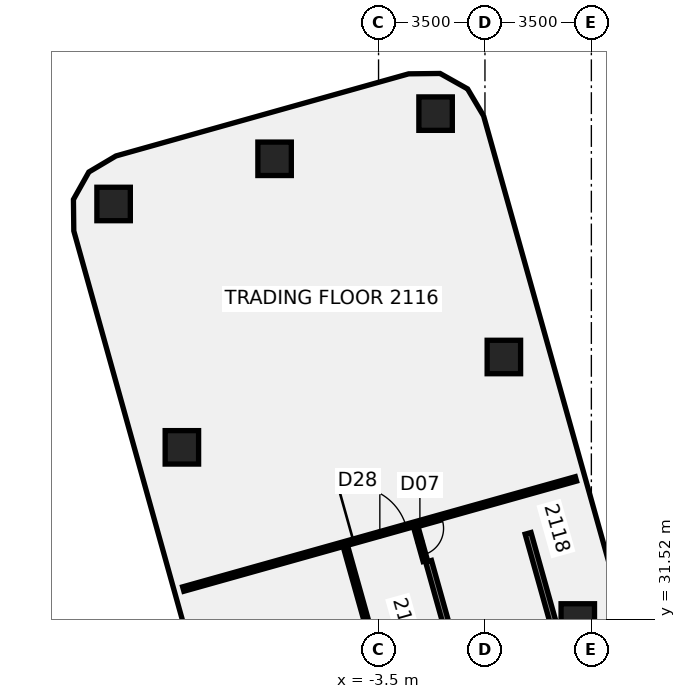
"""IFC4 building model, lengths in metres.
Left out: names, types, materials, properties, quantities, classifications, styles, units other than length and angle.
Written with IfcOpenShell. Run it as: python <this file> out.ifc"""

import sys

from ifc_helpers import new_model, si_unit, direction, frame, frame_2d, origin, origin_2d, place, context, subcontext, project, spatial, polyline, rectangle, outline, extrude, element, fill, save


model = new_model("IFC4")
c1 = context("Model", 3, precision=1e-05, world=origin(), true_north=direction((0.0, 1.0)))
c2 = subcontext(c1, "Body", "Model", "MODEL_VIEW")
j1 = project(units=[si_unit("LENGTHUNIT", "METRE"), si_unit("PLANEANGLEUNIT", "RADIAN")], contexts=[c1])
p1 = place(None, origin())
s1 = spatial("IfcSite", under=j1, at=p1, CompositionType="ELEMENT")
p2 = place(p1, origin())
s2 = spatial("IfcBuilding", under=s1, at=p2, CompositionType="ELEMENT")
p3 = place(p2, frame((0.0, 0.0, 91.0)))
s3 = spatial("IfcBuildingStorey", under=s2, at=p3, CompositionType="ELEMENT", Elevation=91.0)
for number, where, z_axis, x_axis in (
    (1, (-9.969, 37.171, -0.138), (-0.073, -0.049, 0.996), (0.96, 0.269, 0.084)),
    (2, (0.622, 40.143, -0.138), (-0.088, 0.002, 0.996), (0.269, -0.963, 0.026)),
):
    element("IfcColumn", number, at=place(p3, frame(where, z_axis=z_axis, x_axis=x_axis)), inside=s3, PredefinedType="COLUMN", context=c2, shape_type="SweptSolid", body=[
        extrude(rectangle(XDim=1.1, YDim=1.1, at=origin_2d()), origin(), (0.0, 0.0, 1.0), 3.761),
    ])
p4 = place(p3, frame((3.053, 31.477, -0.139), z_axis=(-0.046202853801, 0.014446526118, 0.998827609843), x_axis=(0.2690642181, -0.962761142023, 0.026371005823)))
e3 = element("IfcColumn", 3, at=p4, inside=s3, PredefinedType="COLUMN", context=c2, shape_type="SweptSolid", body=[
    extrude(rectangle(XDim=1.1, YDim=1.1, at=origin_2d()), origin(), (0.0, 0.0, 1.0), 3.752),
])
p5 = place(p3, frame((-1.624, 48.147, -0.139), z_axis=(-0.126536567828, -0.007238046781, 0.991935536051), x_axis=(0.268633059123, -0.96285727472, 0.027242394618)))
e4 = element("IfcColumn", 4, at=p5, inside=s3, PredefinedType="COLUMN", context=c2, shape_type="SweptSolid", body=[
    extrude(rectangle(XDim=1.1, YDim=1.1, at=origin_2d()), origin(), (0.0, 0.0, 1.0), 3.778),
])
p6 = place(p3, frame((-6.919, 46.661, -0.139), z_axis=(-0.119216564291, -0.032713439008, 0.992329200269), x_axis=(0.270210909527, -0.962800883971, 0.000722631434)))
e5 = element("IfcColumn", 5, at=p6, inside=s3, PredefinedType="COLUMN", context=c2, shape_type="SweptSolid", body=[
    extrude(rectangle(XDim=1.1, YDim=1.1, at=origin_2d()), origin(), (0.0, 0.0, 1.0), 3.776),
])
p7 = place(p3, frame((-12.215, 45.176, -0.139), z_axis=(-0.111812108325, -0.05816814884, 0.992025462825), x_axis=(0.955922515822, 0.266445014872, 0.123366112825)))
e6 = element("IfcColumn", 6, at=p7, inside=s3, PredefinedType="COLUMN", context=c2, shape_type="SweptSolid", body=[
    extrude(rectangle(XDim=1.1, YDim=1.1, at=origin_2d()), origin(), (0.0, 0.0, 1.0), 3.777),
])
p8 = place(p3, frame((-4.593, 33.928, 0.0), z_axis=(0.0, 0.0, 1.0), x_axis=(0.27013135505, -0.962823478639, 0.0)))
e7 = element("IfcWall", 7, at=p8, inside=s3, PredefinedType="PARTITIONING", context=c2, shape_type="SweptSolid", body=[
    extrude(rectangle(XDim=11.304, YDim=0.15, at=frame_2d((5.652, 0.0))), origin(), (0.0, 0.0, 1.0), 3.01),
])
p9 = place(p8, frame((9.375, 0.0, 0.0)))
e8 = element("IfcOpeningElement", 8, at=p9, cuts=e7, PredefinedType="OPENING", context=c2, shape_type="SweptSolid", body=[
    extrude(rectangle(XDim=1.0, YDim=2.1, at=frame_2d((0.5, 1.05))), frame((0.0, 0.085, 0.0), z_axis=(0.0, -1.0, 0.0), x_axis=(1.0, 0.0, 0.0)), (0.0, 0.0, 1.0), 0.17),
])
p10 = place(p8, frame((5.175, 0.0, 0.0)))
e9 = element("IfcOpeningElement", 9, at=p10, cuts=e7, PredefinedType="OPENING", context=c2, shape_type="SweptSolid", body=[
    extrude(rectangle(XDim=0.9, YDim=2.1, at=frame_2d((0.45, 1.05))), frame((0.0, 0.085, 0.0), z_axis=(0.0, -1.0, 0.0), x_axis=(1.0, 0.0, 0.0)), (0.0, 0.0, 1.0), 0.17),
])
p11 = place(p3, frame((-2.282, 34.576, 0.0), z_axis=(0.0, 0.0, 1.0), x_axis=(0.270119007493, -0.962826942805, 0.0)))
e10 = element("IfcWall", 10, at=p11, inside=s3, PredefinedType="PARTITIONING", context=c2, shape_type="SweptSolid", body=[
    extrude(rectangle(XDim=1.185, YDim=0.15, at=frame_2d((0.592, 0.0))), origin(), (0.0, 0.0, 1.0), 3.01),
])
p12 = place(p11, frame((0.075, 0.0, 0.0)))
e11 = element("IfcOpeningElement", 11, at=p12, cuts=e10, PredefinedType="OPENING", context=c2, shape_type="SweptSolid", body=[
    extrude(rectangle(XDim=0.9, YDim=2.1, at=frame_2d((0.45, 1.05))), frame((0.0, 0.085, 0.0), z_axis=(0.0, -1.0, 0.0), x_axis=(1.0, 0.0, 0.0)), (0.0, 0.0, 1.0), 0.17),
])
p13 = place(p3, frame((-9.924, 32.51, 0.0), z_axis=(0.0, 0.0, 1.0), x_axis=(0.962841625643, 0.270066665714, 0.0)))
e12 = element("IfcWall", 12, at=p13, inside=s3, PredefinedType="PARTITIONING", context=c2, shape_type="SweptSolid", body=[
    extrude(rectangle(XDim=13.415, YDim=0.15, at=frame_2d((6.707, 0.0))), origin(), (0.0, 0.0, 1.0), 3.01),
])
p14 = place(p13, frame((5.816, 0.0, 0.0)))
e13 = element("IfcOpeningElement", 13, at=p14, cuts=e12, PredefinedType="OPENING", context=c2, shape_type="SweptSolid", body=[
    extrude(rectangle(XDim=1.8, YDim=2.1, at=frame_2d((0.9, 1.05))), frame((0.0, 0.085, 0.0), z_axis=(0.0, -1.0, 0.0), x_axis=(1.0, 0.0, 0.0)), (0.0, 0.0, 1.0), 0.17),
])
p15 = place(p3, frame((-0.045, 26.973, -0.14), z_axis=(0.0, 0.0, 1.0), x_axis=(-0.270121870099, 0.962826139703, 0.0)))
e14 = element("IfcWall", 14, at=p15, inside=s3, PredefinedType="SHEAR", context=c2, shape_type="SweptSolid", body=[
    extrude(rectangle(XDim=6.7, YDim=0.2, at=frame_2d((3.35, 0.0))), origin(), (0.0, 0.0, 1.0), 3.15),
])
p16 = place(p15, frame((0.35, 0.0, 0.0)))
e15 = element("IfcOpeningElement", 15, at=p16, cuts=e14, PredefinedType="OPENING", context=c2, shape_type="SweptSolid", body=[
    extrude(rectangle(XDim=1.0, YDim=2.1, at=frame_2d((0.5, 1.05))), frame((0.0, 0.11, 0.0), z_axis=(0.0, -1.0, 0.0), x_axis=(1.0, 0.0, 0.0)), (0.0, 0.0, 1.0), 0.22),
])
p17 = place(p3, frame((3.229, 27.891, -0.14), z_axis=(0.0, 0.0, 1.0), x_axis=(-0.270121870099, 0.962826139703, 0.0)))
e16 = element("IfcWall", 16, at=p17, inside=s3, PredefinedType="SHEAR", context=c2, shape_type="SweptSolid", body=[
    extrude(rectangle(XDim=6.7, YDim=0.2, at=frame_2d((3.35, 0.0))), origin(), (0.0, 0.0, 1.0), 3.15),
])
p18 = place(p3, frame((0.0, 0.0, -0.14)))
e17 = element("IfcWall", 17, at=p18, inside=s3, PredefinedType="SHEAR", context=c2, shape_type="SweptSolid", body=[
    extrude(outline(polyline([(1.376, 34.123), (1.323, 34.315), (-1.759, 33.451), (-1.705, 33.258), (1.376, 34.123)])), origin(), (0.0, 0.0, 1.0), 3.15),
])
p19 = place(p12, origin())
e18 = element("IfcDoor", 18, at=p19, inside=s3, OperationType="SINGLE_SWING_RIGHT", PredefinedType="DOOR", context=c2, shape_type="SweptSolid", body=[
    extrude(rectangle(XDim=0.9, YDim=2.1, at=frame_2d((0.45, 1.05))), frame((0.0, 0.025, 0.0), z_axis=(0.0, -1.0, 0.0), x_axis=(1.0, 0.0, 0.0)), (0.0, 0.0, 1.0), 0.05),
])
fill(e11, e18)
p20 = place(p14, origin())
e19 = element("IfcDoor", 19, at=p20, inside=s3, OperationType="DOUBLE_DOOR_SINGLE_SWING", PredefinedType="DOOR", context=c2, shape_type="SweptSolid", body=[
    extrude(rectangle(XDim=1.8, YDim=2.1, at=frame_2d((0.9, 1.05))), frame((0.0, 0.025, 0.0), z_axis=(0.0, -1.0, 0.0), x_axis=(1.0, 0.0, 0.0)), (0.0, 0.0, 1.0), 0.05),
])
fill(e13, e19)
save(model, sys.argv[1])
